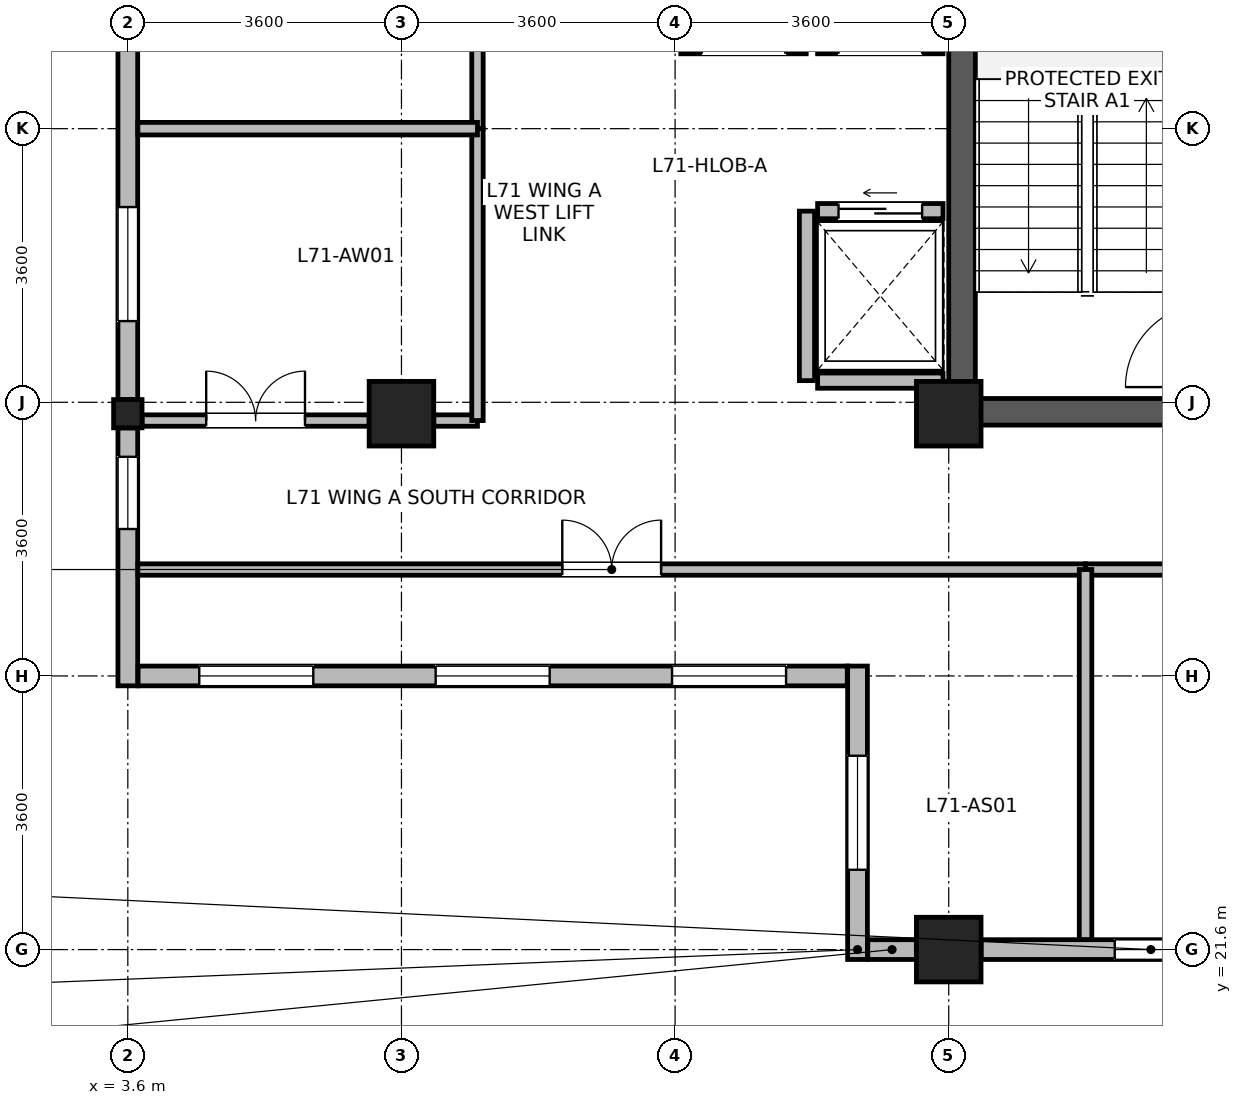
"""IFC4 building model, lengths in metres.
Left out: names, types, materials, properties, quantities, classifications, styles, units other than length and angle.
Written with IfcOpenShell. Run it as: python <this file> out.ifc"""

import sys

from ifc_helpers import new_model, si_unit, direction, frame, frame_2d, origin, origin_2d, place, context, subcontext, project, spatial, rectangle, i_section, extrude, source, transform, mapped, element, fill, save


model = new_model("IFC4")
c1 = context("Model", 3, precision=1e-05, world=origin(), true_north=direction((0.0, 1.0)))
c2 = subcontext(c1, "Body", "Model", "MODEL_VIEW")
j1 = project(units=[si_unit("LENGTHUNIT", "METRE"), si_unit("PLANEANGLEUNIT", "RADIAN")], contexts=[c1])
p1 = place(None, origin())
s1 = spatial("IfcSite", under=j1, at=p1, CompositionType="ELEMENT")
p2 = place(p1, origin())
s2 = spatial("IfcBuilding", under=s1, at=p2, CompositionType="ELEMENT")
p3 = place(p2, frame((0.0, 0.0, 275.8)))
s3 = spatial("IfcBuildingStorey", under=s2, at=p3, CompositionType="ELEMENT", Elevation=275.8)
p4 = place(p3, frame((14.575, 28.5, 0.0), z_axis=(0.0, 0.0, 1.0), x_axis=(0.0, 1.0, 0.0)))
e1 = element("IfcWall", 1, at=p4, inside=s3, PredefinedType="SHEAR", context=c2, shape_type="SweptSolid", body=[
    extrude(rectangle(XDim=7.7, YDim=0.35, at=frame_2d((3.85, 0.0))), origin(), (0.0, 0.0, 1.0), 3.475),
])
p5 = place(p3, frame((14.75, 28.675, 0.0), z_axis=(0.0, 0.0, 1.0), x_axis=(1.0, 0.0, 0.0)))
e2 = element("IfcWall", 2, at=p5, inside=s3, PredefinedType="SHEAR", context=c2, shape_type="SweptSolid", body=[
    extrude(rectangle(XDim=3.2, YDim=0.35, at=frame_2d((1.6, 0.0))), origin(), (0.0, 0.0, 1.0), 3.475),
])
m1 = source(origin(), c2, "Body", "SweptSolid", [
    extrude(rectangle(XDim=0.85, YDim=0.85, at=origin_2d()), origin(), (0.0, 0.0, 1.0), 3.7),
])
for number, where, z_axis, x_axis in (
    (3, (7.2, 28.65, 0.0), (0.0, 0.0, 1.0), (1.0, 0.0, 0.0)),
    (4, (14.4, 21.6, 0.0), (0.0, 0.0, 1.0), (1.0, 0.0, 0.0)),
    (5, (14.4, 28.65, 0.0), (0.0, 0.0, 1.0), (1.0, 0.0, 0.0)),
):
    element("IfcColumn", number, at=place(p3, frame(where, z_axis=z_axis, x_axis=x_axis)), inside=s3, PredefinedType="COLUMN", context=c2, shape_type="MappedRepresentation", body=[
        mapped(m1, transform((0.0, 0.0, 0.0), x_axis=(1.0, 0.0, 0.0), y_axis=(0.0, 1.0, 0.0), z_axis=(0.0, 0.0, 1.0), scale=1.0)),
    ])
m2 = source(origin(), c2, "Body", "SweptSolid", [
    extrude(i_section(OverallWidth=0.374, OverallDepth=0.372, WebThickness=0.015, FlangeThickness=0.026, FilletRadius=0.015, at=origin_2d()), origin(), (0.0, 0.0, 1.0), 3.7),
])
p6 = place(p3, frame((3.6, 28.65, 0.0), z_axis=(0.0, 0.0, 1.0), x_axis=(1.0, 0.0, 0.0)))
e6 = element("IfcColumn", 6, at=p6, inside=s3, PredefinedType="COLUMN", context=c2, shape_type="MappedRepresentation", body=[
    mapped(m2, transform((0.0, 0.0, 0.0), x_axis=(1.0, 0.0, 0.0), y_axis=(0.0, 1.0, 0.0), z_axis=(0.0, 0.0, 1.0), scale=1.0)),
])
p7 = place(p3, frame((13.974, 21.6, 0.0), z_axis=(0.0, 0.0, 1.0), x_axis=(-1.0, 0.0, 0.0)))
e7 = element("IfcWall", 7, at=p7, inside=s3, PredefinedType="STANDARD", context=c2, shape_type="SweptSolid", body=[
    extrude(rectangle(XDim=0.639, YDim=0.26, at=frame_2d((0.32, 0.0))), origin(), (0.0, 0.0, 1.0), 3.455),
])
p8 = place(p3, frame((17.812, 21.6, 0.0), z_axis=(0.0, 0.0, 1.0), x_axis=(-1.0, 0.0, 0.0)))
e8 = element("IfcWall", 8, at=p8, inside=s3, PredefinedType="STANDARD", context=c2, shape_type="SweptSolid", body=[
    extrude(rectangle(XDim=2.986, YDim=0.26, at=frame_2d((1.493, 0.0))), origin(), (0.0, 0.0, 1.0), 3.055),
])
p9 = place(p8, frame((0.278, 0.0, 0.85)))
e9 = element("IfcOpeningElement", 9, at=p9, cuts=e8, PredefinedType="OPENING", context=c2, shape_type="SweptSolid", body=[
    extrude(rectangle(XDim=0.95, YDim=1.75, at=frame_2d((0.475, 0.875))), frame((0.0, 0.14, 0.0), z_axis=(0.0, -1.0, 0.0), x_axis=(1.0, 0.0, 0.0)), (0.0, 0.0, 1.0), 0.28),
])
p10 = place(p3, frame((3.6, 28.837, 0.0), z_axis=(0.0, 0.0, 1.0), x_axis=(0.0, 1.0, 0.0)))
e10 = element("IfcWall", 10, at=p10, inside=s3, PredefinedType="STANDARD", context=c2, shape_type="SweptSolid", body=[
    extrude(rectangle(XDim=7.126, YDim=0.26, at=frame_2d((3.563, 0.0))), origin(), (0.0, 0.0, 1.0), 3.055),
])
p11 = place(p10, frame((1.031, 0.0, 0.85)))
e11 = element("IfcOpeningElement", 11, at=p11, cuts=e10, PredefinedType="OPENING", context=c2, shape_type="SweptSolid", body=[
    extrude(rectangle(XDim=1.5, YDim=1.85, at=frame_2d((0.75, 0.925))), frame((0.0, 0.14, 0.0), z_axis=(0.0, -1.0, 0.0), x_axis=(1.0, 0.0, 0.0)), (0.0, 0.0, 1.0), 0.28),
])
p12 = place(p10, frame((4.594, 0.0, 0.85)))
e12 = element("IfcOpeningElement", 12, at=p12, cuts=e10, PredefinedType="OPENING", context=c2, shape_type="SweptSolid", body=[
    extrude(rectangle(XDim=1.5, YDim=1.85, at=frame_2d((0.75, 0.925))), frame((0.0, 0.14, 0.0), z_axis=(0.0, -1.0, 0.0), x_axis=(1.0, 0.0, 0.0)), (0.0, 0.0, 1.0), 0.28),
])
p13 = place(p3, frame((3.6, 25.07, 0.0), z_axis=(0.0, 0.0, 1.0), x_axis=(0.0, 1.0, 0.0)))
e13 = element("IfcWall", 13, at=p13, inside=s3, PredefinedType="STANDARD", context=c2, shape_type="SweptSolid", body=[
    extrude(rectangle(XDim=3.393, YDim=0.26, at=frame_2d((1.696, 0.0))), origin(), (0.0, 0.0, 1.0), 3.455),
])
p14 = place(p13, frame((2.063, 0.0, 0.85)))
e14 = element("IfcOpeningElement", 14, at=p14, cuts=e13, PredefinedType="OPENING", context=c2, shape_type="SweptSolid", body=[
    extrude(rectangle(XDim=0.95, YDim=1.75, at=frame_2d((0.475, 0.875))), frame((0.0, 0.14, 0.0), z_axis=(0.0, -1.0, 0.0), x_axis=(1.0, 0.0, 0.0)), (0.0, 0.0, 1.0), 0.28),
])
p15 = place(p3, frame((13.065, 25.2, 0.0), z_axis=(0.0, 0.0, 1.0), x_axis=(-1.0, 0.0, 0.0)))
e15 = element("IfcWall", 15, at=p15, inside=s3, PredefinedType="STANDARD", context=c2, shape_type="SweptSolid", body=[
    extrude(rectangle(XDim=9.33, YDim=0.26, at=frame_2d((4.665, 0.0))), origin(), (0.0, 0.0, 1.0), 3.455),
])
p16 = place(p15, frame((0.805, 0.0, 0.85)))
e16 = element("IfcOpeningElement", 16, at=p16, cuts=e15, PredefinedType="OPENING", context=c2, shape_type="SweptSolid", body=[
    extrude(rectangle(XDim=1.5, YDim=1.85, at=frame_2d((0.75, 0.925))), frame((0.0, 0.14, 0.0), z_axis=(0.0, -1.0, 0.0), x_axis=(1.0, 0.0, 0.0)), (0.0, 0.0, 1.0), 0.28),
])
p17 = place(p15, frame((3.915, 0.0, 0.85)))
e17 = element("IfcOpeningElement", 17, at=p17, cuts=e15, PredefinedType="OPENING", context=c2, shape_type="SweptSolid", body=[
    extrude(rectangle(XDim=1.5, YDim=1.85, at=frame_2d((0.75, 0.925))), frame((0.0, 0.14, 0.0), z_axis=(0.0, -1.0, 0.0), x_axis=(1.0, 0.0, 0.0)), (0.0, 0.0, 1.0), 0.28),
])
p18 = place(p15, frame((7.025, 0.0, 0.85)))
e18 = element("IfcOpeningElement", 18, at=p18, cuts=e15, PredefinedType="OPENING", context=c2, shape_type="SweptSolid", body=[
    extrude(rectangle(XDim=1.5, YDim=1.85, at=frame_2d((0.75, 0.925))), frame((0.0, 0.14, 0.0), z_axis=(0.0, -1.0, 0.0), x_axis=(1.0, 0.0, 0.0)), (0.0, 0.0, 1.0), 0.28),
])
p19 = place(p3, frame((13.2, 21.47, 0.0), z_axis=(0.0, 0.0, 1.0), x_axis=(0.0, 1.0, 0.0)))
e19 = element("IfcWall", 19, at=p19, inside=s3, PredefinedType="STANDARD", context=c2, shape_type="SweptSolid", body=[
    extrude(rectangle(XDim=3.86, YDim=0.26, at=frame_2d((1.93, 0.0))), origin(), (0.0, 0.0, 1.0), 3.455),
])
p20 = place(p19, frame((1.18, 0.0, 0.85)))
e20 = element("IfcOpeningElement", 20, at=p20, cuts=e19, PredefinedType="OPENING", context=c2, shape_type="SweptSolid", body=[
    extrude(rectangle(XDim=1.5, YDim=1.85, at=frame_2d((0.75, 0.925))), frame((0.0, 0.14, 0.0), z_axis=(0.0, -1.0, 0.0), x_axis=(1.0, 0.0, 0.0)), (0.0, 0.0, 1.0), 0.28),
])
p21 = place(p3, frame((12.675, 33.485, 0.0), z_axis=(0.0, 0.0, 1.0), x_axis=(1.0, 0.0, 0.0)))
e21 = element("IfcWall", 21, at=p21, inside=s3, PredefinedType="PARTITIONING", context=c2, shape_type="SweptSolid", body=[
    extrude(rectangle(XDim=1.65, YDim=0.2, at=frame_2d((0.825, 0.0))), origin(), (0.0, 0.0, 1.0), 3.455),
])
p22 = place(p21, frame((0.275, 0.0, 0.0)))
e22 = element("IfcOpeningElement", 22, at=p22, cuts=e21, PredefinedType="OPENING", context=c2, shape_type="SweptSolid", body=[
    extrude(rectangle(XDim=1.1, YDim=2.12, at=frame_2d((0.55, 1.06))), frame((0.0, 0.11, 0.0), z_axis=(0.0, -1.0, 0.0), x_axis=(1.0, 0.0, 0.0)), (0.0, 0.0, 1.0), 0.22),
])
p23 = place(p3, frame((12.675, 29.085, 0.0), z_axis=(0.0, 0.0, 1.0), x_axis=(1.0, 0.0, 0.0)))
e23 = element("IfcWall", 23, at=p23, inside=s3, PredefinedType="PARTITIONING", context=c2, shape_type="SweptSolid", body=[
    extrude(rectangle(XDim=1.65, YDim=0.2, at=frame_2d((0.825, 0.0))), origin(), (0.0, 0.0, 1.0), 3.455),
])
p24 = place(p3, frame((12.675, 31.315, 0.0), z_axis=(0.0, 0.0, 1.0), x_axis=(1.0, 0.0, 0.0)))
e24 = element("IfcWall", 24, at=p24, inside=s3, PredefinedType="PARTITIONING", context=c2, shape_type="SweptSolid", body=[
    extrude(rectangle(XDim=1.65, YDim=0.2, at=frame_2d((0.825, 0.0))), origin(), (0.0, 0.0, 1.0), 3.455),
])
p25 = place(p24, frame((0.275, 0.0, 0.0)))
e25 = element("IfcOpeningElement", 25, at=p25, cuts=e24, PredefinedType="OPENING", context=c2, shape_type="SweptSolid", body=[
    extrude(rectangle(XDim=1.1, YDim=2.12, at=frame_2d((0.55, 1.06))), frame((0.0, 0.11, 0.0), z_axis=(0.0, -1.0, 0.0), x_axis=(1.0, 0.0, 0.0)), (0.0, 0.0, 1.0), 0.22),
])
p26 = place(p3, frame((12.535, 29.085, 0.0), z_axis=(0.0, 0.0, 1.0), x_axis=(0.0, 1.0, 0.0)))
e26 = element("IfcWall", 26, at=p26, inside=s3, PredefinedType="PARTITIONING", context=c2, shape_type="SweptSolid", body=[
    extrude(rectangle(XDim=2.23, YDim=0.2, at=frame_2d((1.115, 0.0))), origin(), (0.0, 0.0, 1.0), 3.455),
])
p27 = place(p3, frame((10.875, 33.485, 0.0), z_axis=(0.0, 0.0, 1.0), x_axis=(1.0, 0.0, 0.0)))
e27 = element("IfcWall", 27, at=p27, inside=s3, PredefinedType="PARTITIONING", context=c2, shape_type="SweptSolid", body=[
    extrude(rectangle(XDim=1.65, YDim=0.2, at=frame_2d((0.825, 0.0))), origin(), (0.0, 0.0, 1.0), 3.455),
])
p28 = place(p27, frame((0.275, 0.0, 0.0)))
e28 = element("IfcOpeningElement", 28, at=p28, cuts=e27, PredefinedType="OPENING", context=c2, shape_type="SweptSolid", body=[
    extrude(rectangle(XDim=1.1, YDim=2.12, at=frame_2d((0.55, 1.06))), frame((0.0, 0.11, 0.0), z_axis=(0.0, -1.0, 0.0), x_axis=(1.0, 0.0, 0.0)), (0.0, 0.0, 1.0), 0.22),
])
p29 = place(p3, frame((16.2, 26.6, 0.0), z_axis=(0.0, 0.0, 1.0), x_axis=(1.0, 0.0, 0.0)))
e29 = element("IfcWall", 29, at=p29, inside=s3, PredefinedType="PARTITIONING", context=c2, shape_type="SweptSolid", body=[
    extrude(rectangle(XDim=18.9, YDim=0.15, at=frame_2d((9.45, 0.0))), origin(), (0.0, 0.0, 1.0), 3.455),
])
p30 = place(p29, frame((8.8, 0.0, 0.0)))
e30 = element("IfcOpeningElement", 30, at=p30, cuts=e29, PredefinedType="OPENING", context=c2, shape_type="SweptSolid", body=[
    extrude(rectangle(XDim=1.3, YDim=2.12, at=frame_2d((0.65, 1.06))), frame((0.0, 0.085, 0.0), z_axis=(0.0, -1.0, 0.0), x_axis=(1.0, 0.0, 0.0)), (0.0, 0.0, 1.0), 0.17),
])
p31 = place(p3, frame((3.732, 26.6, 0.0), z_axis=(0.0, 0.0, 1.0), x_axis=(1.0, 0.0, 0.0)))
e31 = element("IfcWall", 31, at=p31, inside=s3, PredefinedType="PARTITIONING", context=c2, shape_type="SweptSolid", body=[
    extrude(rectangle(XDim=12.468, YDim=0.15, at=frame_2d((6.234, 0.0))), origin(), (0.0, 0.0, 1.0), 3.455),
])
p32 = place(p31, frame((5.584, 0.0, 0.0)))
e32 = element("IfcOpeningElement", 32, at=p32, cuts=e31, PredefinedType="OPENING", context=c2, shape_type="SweptSolid", body=[
    extrude(rectangle(XDim=1.3, YDim=2.12, at=frame_2d((0.65, 1.06))), frame((0.0, 0.085, 0.0), z_axis=(0.0, -1.0, 0.0), x_axis=(1.0, 0.0, 0.0)), (0.0, 0.0, 1.0), 0.17),
])
p33 = place(p3, frame((3.787, 28.56, 0.0), z_axis=(0.0, 0.0, 1.0), x_axis=(1.0, 0.0, 0.0)))
e33 = element("IfcWall", 33, at=p33, inside=s3, PredefinedType="PARTITIONING", context=c2, shape_type="SweptSolid", body=[
    extrude(rectangle(XDim=2.988, YDim=0.15, at=frame_2d((1.494, 0.0))), origin(), (0.0, 0.0, 1.0), 2.905),
])
p34 = place(p33, frame((0.844, 0.0, 0.0)))
e34 = element("IfcOpeningElement", 34, at=p34, cuts=e33, PredefinedType="OPENING", context=c2, shape_type="SweptSolid", body=[
    extrude(rectangle(XDim=1.3, YDim=2.12, at=frame_2d((0.65, 1.06))), frame((0.0, 0.085, 0.0), z_axis=(0.0, -1.0, 0.0), x_axis=(1.0, 0.0, 0.0)), (0.0, 0.0, 1.0), 0.17),
])
p35 = place(p3, frame((7.625, 28.56, 0.0), z_axis=(0.0, 0.0, 1.0), x_axis=(1.0, 0.0, 0.0)))
e35 = element("IfcWall", 35, at=p35, inside=s3, PredefinedType="PARTITIONING", context=c2, shape_type="SweptSolid", body=[
    extrude(rectangle(XDim=0.575, YDim=0.15, at=frame_2d((0.288, 0.0))), origin(), (0.0, 0.0, 1.0), 2.905),
])
p36 = place(p3, frame((8.2, 32.4, 0.0), z_axis=(0.0, 0.0, 1.0), x_axis=(0.0, 1.0, 0.0)))
e36 = element("IfcWall", 36, at=p36, inside=s3, PredefinedType="PARTITIONING", context=c2, shape_type="SweptSolid", body=[
    extrude(rectangle(XDim=3.84, YDim=0.15, at=frame_2d((1.92, 0.0))), origin(), (0.0, 0.0, 1.0), 3.455),
])
p37 = place(p36, frame((1.445, 0.0, 0.0)))
e37 = element("IfcOpeningElement", 37, at=p37, cuts=e36, PredefinedType="OPENING", context=c2, shape_type="SweptSolid", body=[
    extrude(rectangle(XDim=0.95, YDim=2.1, at=frame_2d((0.475, 1.05))), frame((0.0, 0.085, 0.0), z_axis=(0.0, -1.0, 0.0), x_axis=(1.0, 0.0, 0.0)), (0.0, 0.0, 1.0), 0.17),
])
p38 = place(p3, frame((8.2, 28.56, 0.0), z_axis=(0.0, 0.0, 1.0), x_axis=(0.0, 1.0, 0.0)))
e38 = element("IfcWall", 38, at=p38, inside=s3, PredefinedType="PARTITIONING", context=c2, shape_type="SweptSolid", body=[
    extrude(rectangle(XDim=3.84, YDim=0.15, at=frame_2d((1.92, 0.0))), origin(), (0.0, 0.0, 1.0), 3.455),
])
p39 = place(p3, frame((16.2, 21.732, 0.0), z_axis=(0.0, 0.0, 1.0), x_axis=(0.0, 1.0, 0.0)))
e39 = element("IfcWall", 39, at=p39, inside=s3, PredefinedType="PARTITIONING", context=c2, shape_type="SweptSolid", body=[
    extrude(rectangle(XDim=4.868, YDim=0.165, at=frame_2d((2.434, 0.0))), origin(), (0.0, 0.0, 1.0), 3.455),
])
p40 = place(p3, frame((3.732, 32.4, 0.0), z_axis=(0.0, 0.0, 1.0), x_axis=(1.0, 0.0, 0.0)))
e40 = element("IfcWall", 40, at=p40, inside=s3, PredefinedType="PARTITIONING", context=c2, shape_type="SweptSolid", body=[
    extrude(rectangle(XDim=4.468, YDim=0.165, at=frame_2d((2.234, 0.0))), origin(), (0.0, 0.0, 1.0), 3.455),
])
p41 = place(p9, origin())
e41 = element("IfcWindow", 41, at=p41, inside=s3, PartitioningType="SINGLE_PANEL", PredefinedType="WINDOW", context=c2, shape_type="SweptSolid", body=[
    extrude(rectangle(XDim=0.95, YDim=1.75, at=frame_2d((0.475, 0.875))), frame((0.0, 0.03, 0.0), z_axis=(0.0, -1.0, 0.0), x_axis=(1.0, 0.0, 0.0)), (0.0, 0.0, 1.0), 0.06),
])
fill(e9, e41)
p42 = place(p11, origin())
e42 = element("IfcWindow", 42, at=p42, inside=s3, PartitioningType="SINGLE_PANEL", PredefinedType="WINDOW", context=c2, shape_type="SweptSolid", body=[
    extrude(rectangle(XDim=1.5, YDim=1.85, at=frame_2d((0.75, 0.925))), frame((0.0, 0.03, 0.0), z_axis=(0.0, -1.0, 0.0), x_axis=(1.0, 0.0, 0.0)), (0.0, 0.0, 1.0), 0.06),
])
fill(e11, e42)
p43 = place(p14, origin())
e43 = element("IfcWindow", 43, at=p43, inside=s3, PartitioningType="SINGLE_PANEL", PredefinedType="WINDOW", context=c2, shape_type="SweptSolid", body=[
    extrude(rectangle(XDim=0.95, YDim=1.75, at=frame_2d((0.475, 0.875))), frame((0.0, 0.03, 0.0), z_axis=(0.0, -1.0, 0.0), x_axis=(1.0, 0.0, 0.0)), (0.0, 0.0, 1.0), 0.06),
])
fill(e14, e43)
p44 = place(p16, origin())
e44 = element("IfcWindow", 44, at=p44, inside=s3, PartitioningType="SINGLE_PANEL", PredefinedType="WINDOW", context=c2, shape_type="SweptSolid", body=[
    extrude(rectangle(XDim=1.5, YDim=1.85, at=frame_2d((0.75, 0.925))), frame((0.0, 0.03, 0.0), z_axis=(0.0, -1.0, 0.0), x_axis=(1.0, 0.0, 0.0)), (0.0, 0.0, 1.0), 0.06),
])
fill(e16, e44)
p45 = place(p17, origin())
e45 = element("IfcWindow", 45, at=p45, inside=s3, PartitioningType="SINGLE_PANEL", PredefinedType="WINDOW", context=c2, shape_type="SweptSolid", body=[
    extrude(rectangle(XDim=1.5, YDim=1.85, at=frame_2d((0.75, 0.925))), frame((0.0, 0.03, 0.0), z_axis=(0.0, -1.0, 0.0), x_axis=(1.0, 0.0, 0.0)), (0.0, 0.0, 1.0), 0.06),
])
fill(e17, e45)
p46 = place(p18, origin())
e46 = element("IfcWindow", 46, at=p46, inside=s3, PartitioningType="SINGLE_PANEL", PredefinedType="WINDOW", context=c2, shape_type="SweptSolid", body=[
    extrude(rectangle(XDim=1.5, YDim=1.85, at=frame_2d((0.75, 0.925))), frame((0.0, 0.03, 0.0), z_axis=(0.0, -1.0, 0.0), x_axis=(1.0, 0.0, 0.0)), (0.0, 0.0, 1.0), 0.06),
])
fill(e18, e46)
p47 = place(p20, origin())
e47 = element("IfcWindow", 47, at=p47, inside=s3, PartitioningType="SINGLE_PANEL", PredefinedType="WINDOW", context=c2, shape_type="SweptSolid", body=[
    extrude(rectangle(XDim=1.5, YDim=1.85, at=frame_2d((0.75, 0.925))), frame((0.0, 0.03, 0.0), z_axis=(0.0, -1.0, 0.0), x_axis=(1.0, 0.0, 0.0)), (0.0, 0.0, 1.0), 0.06),
])
fill(e20, e47)
p48 = place(p25, origin())
e48 = element("IfcDoor", 48, at=p48, inside=s3, OperationType="SLIDING_TO_LEFT", PredefinedType="DOOR", context=c2, shape_type="SweptSolid", body=[
    extrude(rectangle(XDim=1.1, YDim=2.12, at=frame_2d((0.55, 1.06))), frame((0.0, 0.025, 0.0), z_axis=(0.0, -1.0, 0.0), x_axis=(1.0, 0.0, 0.0)), (0.0, 0.0, 1.0), 0.05),
])
fill(e25, e48)
p49 = place(p32, origin())
e49 = element("IfcDoor", 49, at=p49, inside=s3, OperationType="DOUBLE_DOOR_SINGLE_SWING", PredefinedType="DOOR", context=c2, shape_type="SweptSolid", body=[
    extrude(rectangle(XDim=1.3, YDim=2.12, at=frame_2d((0.65, 1.06))), frame((0.0, 0.025, 0.0), z_axis=(0.0, -1.0, 0.0), x_axis=(1.0, 0.0, 0.0)), (0.0, 0.0, 1.0), 0.05),
])
fill(e32, e49)
p50 = place(p34, origin())
e50 = element("IfcDoor", 50, at=p50, inside=s3, OperationType="DOUBLE_DOOR_SINGLE_SWING", PredefinedType="DOOR", context=c2, shape_type="SweptSolid", body=[
    extrude(rectangle(XDim=1.3, YDim=2.12, at=frame_2d((0.65, 1.06))), frame((0.0, 0.025, 0.0), z_axis=(0.0, -1.0, 0.0), x_axis=(1.0, 0.0, 0.0)), (0.0, 0.0, 1.0), 0.05),
])
fill(e34, e50)
save(model, sys.argv[1])
